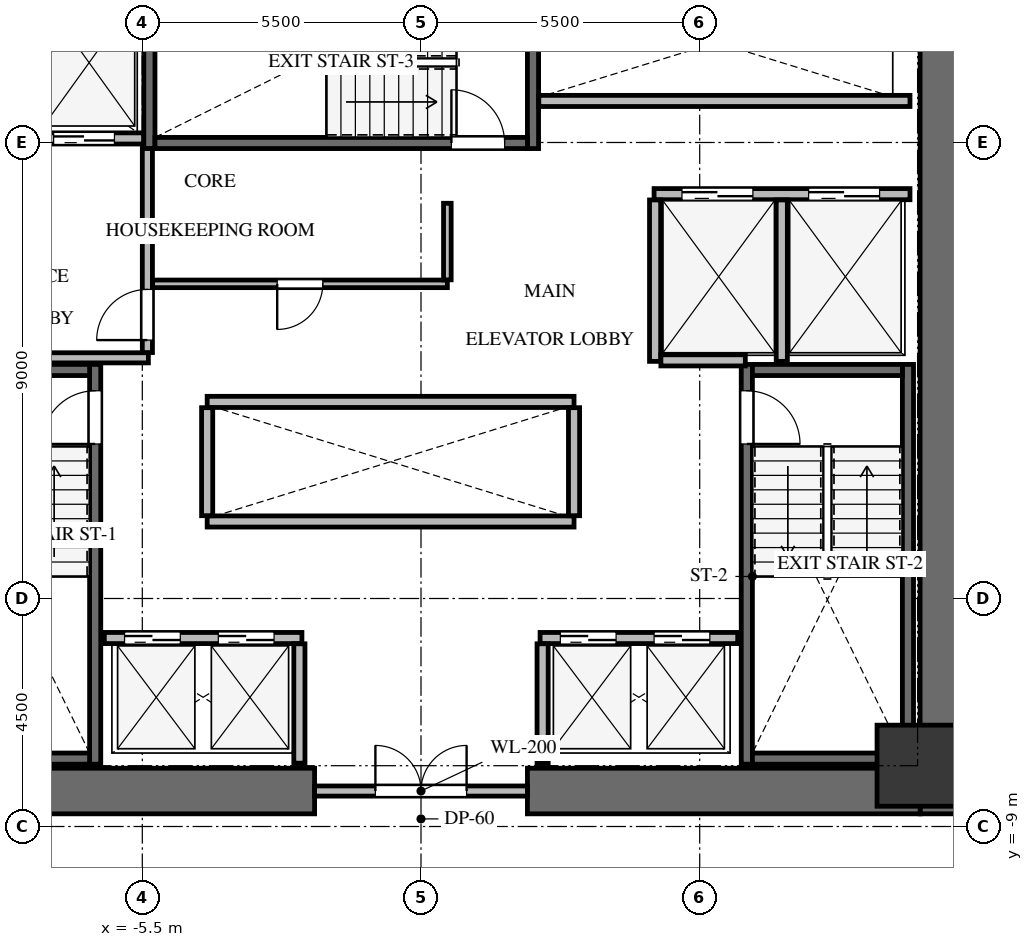
"""IFC4 building model, lengths in metres.
Left out: names, types, materials, properties, quantities, classifications, styles, units other than length and angle.
Written with IfcOpenShell. Run it as: python <this file> out.ifc"""

import sys

from ifc_helpers import new_model, si_unit, direction, frame, frame_2d, origin, origin_2d, place, context, subcontext, project, spatial, rectangle, extrude, source, transform, mapped, element, fill, save


model = new_model("IFC4")
c1 = context("Model", 3, precision=1e-05, world=origin(), true_north=direction((0.0, 1.0)))
c2 = subcontext(c1, "Body", "Model", "MODEL_VIEW")
j1 = project(units=[si_unit("LENGTHUNIT", "METRE"), si_unit("PLANEANGLEUNIT", "RADIAN")], contexts=[c1])
p1 = place(None, origin())
s1 = spatial("IfcSite", under=j1, at=p1, CompositionType="ELEMENT")
p2 = place(p1, origin())
s2 = spatial("IfcBuilding", under=s1, at=p2, CompositionType="ELEMENT")
p3 = place(p2, frame((0.0, 0.0, 45.6)))
s3 = spatial("IfcBuildingStorey", under=s2, at=p3, CompositionType="ELEMENT", Elevation=45.6)
p4 = place(p3, frame((10.3, -8.75, 0.0), z_axis=(0.0, 0.0, 1.0), x_axis=(0.0, 1.0, 0.0)))
e1 = element("IfcWall", 1, at=p4, inside=s3, PredefinedType="SHEAR", context=c2, shape_type="SweptSolid", body=[
    extrude(rectangle(XDim=17.5, YDim=0.9, at=frame_2d((8.75, 0.0))), origin(), (0.0, 0.0, 1.0), 3.3),
])
for number, where, z_axis, x_axis in (
    (2, (-9.85, -8.3, 0.0), (0.0, 0.0, 1.0), (1.0, 0.0, 0.0)),
    (3, (2.1, -8.3, 0.0), (0.0, 0.0, 1.0), (1.0, 0.0, 0.0)),
):
    element("IfcWall", number, at=place(p3, frame(where, z_axis=z_axis, x_axis=x_axis)), inside=s3, PredefinedType="SHEAR", context=c2, shape_type="SweptSolid", body=[
        extrude(rectangle(XDim=7.75, YDim=0.9, at=frame_2d((3.875, 0.0))), origin(), (0.0, 0.0, 1.0), 3.3),
    ])
p5 = place(p3, frame((-6.43, -7.77, -0.24), z_axis=(0.0, 0.0, 1.0), x_axis=(0.0, 1.0, 0.0)))
e4 = element("IfcWall", 4, at=p5, inside=s3, PredefinedType="SHEAR", context=c2, shape_type="SweptSolid", body=[
    extrude(rectangle(XDim=7.89, YDim=0.22, at=frame_2d((3.945, 0.0))), origin(), (0.0, 0.0, 1.0), 3.3),
])
p6 = place(p5, frame((6.32, 0.0, 0.0)))
e5 = element("IfcOpeningElement", 5, at=p6, cuts=e4, PredefinedType="OPENING", context=c2, shape_type="SweptSolid", body=[
    extrude(rectangle(XDim=1.05, YDim=2.15, at=frame_2d((0.525, 1.075))), frame((0.0, 0.12, 0.0), z_axis=(0.0, -1.0, 0.0), x_axis=(1.0, 0.0, 0.0)), (0.0, 0.0, 1.0), 0.24),
])
for number, where, z_axis, x_axis in (
    (6, (-9.5, -7.66, -0.24), (0.0, 0.0, 1.0), (1.0, 0.0, 0.0)),
    (7, (-6.54, 0.01, -0.24), (0.0, 0.0, 1.0), (-1.0, 0.0, 0.0)),
):
    element("IfcWall", number, at=place(p3, frame(where, z_axis=z_axis, x_axis=x_axis)), inside=s3, PredefinedType="SHEAR", context=c2, shape_type="SweptSolid", body=[
        extrude(rectangle(XDim=2.96, YDim=0.22, at=frame_2d((1.48, 0.0))), origin(), (0.0, 0.0, 1.0), 3.3),
    ])
p7 = place(p3, frame((9.61, -7.77, -0.24), z_axis=(0.0, 0.0, 1.0), x_axis=(0.0, 1.0, 0.0)))
e8 = element("IfcWall", 8, at=p7, inside=s3, PredefinedType="SHEAR", context=c2, shape_type="SweptSolid", body=[
    extrude(rectangle(XDim=7.89, YDim=0.22, at=frame_2d((3.945, 0.0))), origin(), (0.0, 0.0, 1.0), 3.3),
])
p8 = place(p3, frame((6.43, 0.12, -0.24), z_axis=(0.0, 0.0, 1.0), x_axis=(0.0, -1.0, 0.0)))
e9 = element("IfcWall", 9, at=p8, inside=s3, PredefinedType="SHEAR", context=c2, shape_type="SweptSolid", body=[
    extrude(rectangle(XDim=7.89, YDim=0.22, at=frame_2d((3.945, 0.0))), origin(), (0.0, 0.0, 1.0), 3.3),
])
p9 = place(p8, frame((0.52, 0.0, 0.0)))
e10 = element("IfcOpeningElement", 10, at=p9, cuts=e9, PredefinedType="OPENING", context=c2, shape_type="SweptSolid", body=[
    extrude(rectangle(XDim=1.05, YDim=2.15, at=frame_2d((0.525, 1.075))), frame((0.0, 0.12, 0.0), z_axis=(0.0, -1.0, 0.0), x_axis=(1.0, 0.0, 0.0)), (0.0, 0.0, 1.0), 0.24),
])
for number, where, z_axis, x_axis in (
    (11, (6.54, -7.66, -0.24), (0.0, 0.0, 1.0), (1.0, 0.0, 0.0)),
    (12, (9.5, 0.01, -0.24), (0.0, 0.0, 1.0), (-1.0, 0.0, 0.0)),
):
    element("IfcWall", number, at=place(p3, frame(where, z_axis=z_axis, x_axis=x_axis)), inside=s3, PredefinedType="SHEAR", context=c2, shape_type="SweptSolid", body=[
        extrude(rectangle(XDim=2.96, YDim=0.22, at=frame_2d((1.48, 0.0))), origin(), (0.0, 0.0, 1.0), 3.3),
    ])
for number, where, z_axis, x_axis in (
    (13, (2.21, 4.38, -0.24), (0.0, 0.0, 1.0), (0.0, 1.0, 0.0)),
    (14, (-5.36, 7.78, -0.24), (0.0, 0.0, 1.0), (0.0, -1.0, 0.0)),
):
    element("IfcWall", number, at=place(p3, frame(where, z_axis=z_axis, x_axis=x_axis)), inside=s3, PredefinedType="SHEAR", context=c2, shape_type="SweptSolid", body=[
        extrude(rectangle(XDim=3.4, YDim=0.22, at=frame_2d((1.7, 0.0))), origin(), (0.0, 0.0, 1.0), 3.3),
    ])
p10 = place(p3, frame((-5.25, 4.49, -0.24), z_axis=(0.0, 0.0, 1.0), x_axis=(1.0, 0.0, 0.0)))
e15 = element("IfcWall", 15, at=p10, inside=s3, PredefinedType="SHEAR", context=c2, shape_type="SweptSolid", body=[
    extrude(rectangle(XDim=7.35, YDim=0.22, at=frame_2d((3.675, 0.0))), origin(), (0.0, 0.0, 1.0), 3.3),
])
p11 = place(p10, frame((5.85, 0.0, 0.0)))
e16 = element("IfcOpeningElement", 16, at=p11, cuts=e15, PredefinedType="OPENING", context=c2, shape_type="SweptSolid", body=[
    extrude(rectangle(XDim=1.05, YDim=2.15, at=frame_2d((0.525, 1.075))), frame((0.0, 0.12, 0.0), z_axis=(0.0, -1.0, 0.0), x_axis=(1.0, 0.0, 0.0)), (0.0, 0.0, 1.0), 0.24),
])
m1 = source(origin(), c2, "Body", "SweptSolid", [
    extrude(rectangle(XDim=1.6, YDim=1.6, at=origin_2d()), origin(), (0.0, 0.0, 1.0), 3.3),
])
p12 = place(p3, frame((9.8, -7.8, -0.24), z_axis=(0.0, 0.0, 1.0), x_axis=(1.0, 0.0, 0.0)))
e17 = element("IfcColumn", 17, at=p12, inside=s3, PredefinedType="COLUMN", context=c2, shape_type="MappedRepresentation", body=[
    mapped(m1, transform((0.0, 0.0, 0.0), x_axis=(1.0, 0.0, 0.0), y_axis=(0.0, 1.0, 0.0), z_axis=(0.0, 0.0, 1.0), scale=1.0)),
])
p13 = place(p3, frame((-2.1, -8.3, 0.0), z_axis=(0.0, 0.0, 1.0), x_axis=(1.0, 0.0, 0.0)))
e18 = element("IfcWall", 18, at=p13, inside=s3, PredefinedType="SOLIDWALL", context=c2, shape_type="SweptSolid", body=[
    extrude(rectangle(XDim=4.2, YDim=0.2, at=frame_2d((2.1, 0.0))), origin(), (0.0, 0.0, 1.0), 3.045),
])
p14 = place(p13, frame((1.2, 0.0, 0.0)))
e19 = element("IfcOpeningElement", 19, at=p14, cuts=e18, PredefinedType="OPENING", context=c2, shape_type="SweptSolid", body=[
    extrude(rectangle(XDim=1.8, YDim=2.15, at=frame_2d((0.9, 1.075))), frame((0.0, 0.11, 0.0), z_axis=(0.0, -1.0, 0.0), x_axis=(1.0, 0.0, 0.0)), (0.0, 0.0, 1.0), 0.22),
])
p15 = place(p3, frame((-9.65, 4.58, 0.0), z_axis=(0.0, 0.0, 1.0), x_axis=(1.0, 0.0, 0.0)))
e20 = element("IfcWall", 20, at=p15, inside=s3, PredefinedType="SOLIDWALL", context=c2, shape_type="SweptSolid", body=[
    extrude(rectangle(XDim=4.175, YDim=0.22, at=frame_2d((2.087, 0.0))), origin(), (0.0, 0.0, 1.0), 3.045),
])
p16 = place(p15, frame((0.4, 0.0, 0.0)))
e21 = element("IfcOpeningElement", 21, at=p16, cuts=e20, PredefinedType="OPENING", context=c2, shape_type="SweptSolid", body=[
    extrude(rectangle(XDim=1.2, YDim=2.15, at=frame_2d((0.6, 1.075))), frame((0.0, 0.12, 0.0), z_axis=(0.0, -1.0, 0.0), x_axis=(1.0, 0.0, 0.0)), (0.0, 0.0, 1.0), 0.24),
])
p17 = place(p15, frame((2.4, 0.0, 0.0)))
e22 = element("IfcOpeningElement", 22, at=p17, cuts=e20, PredefinedType="OPENING", context=c2, shape_type="SweptSolid", body=[
    extrude(rectangle(XDim=1.2, YDim=2.15, at=frame_2d((0.6, 1.075))), frame((0.0, 0.12, 0.0), z_axis=(0.0, -1.0, 0.0), x_axis=(1.0, 0.0, 0.0)), (0.0, 0.0, 1.0), 0.24),
])
p18 = place(p3, frame((-9.65, 0.25, 0.0), z_axis=(0.0, 0.0, 1.0), x_axis=(1.0, 0.0, 0.0)))
e23 = element("IfcWall", 23, at=p18, inside=s3, PredefinedType="SOLIDWALL", context=c2, shape_type="SweptSolid", body=[
    extrude(rectangle(XDim=4.27, YDim=0.2, at=frame_2d((2.135, 0.0))), origin(), (0.0, 0.0, 1.0), 3.045),
])
p19 = place(p3, frame((-5.4, 0.354, 0.0), z_axis=(0.0, 0.0, 1.0), x_axis=(0.0, 1.0, 0.0)))
e24 = element("IfcWall", 24, at=p19, inside=s3, PredefinedType="SOLIDWALL", context=c2, shape_type="SweptSolid", body=[
    extrude(rectangle(XDim=4.026, YDim=0.2, at=frame_2d((2.013, 0.0))), origin(), (0.0, 0.0, 1.0), 3.045),
])
p20 = place(p19, frame((0.246, 0.0, 0.0)))
e25 = element("IfcOpeningElement", 25, at=p20, cuts=e24, PredefinedType="OPENING", context=c2, shape_type="SweptSolid", body=[
    extrude(rectangle(XDim=1.0, YDim=2.15, at=frame_2d((0.5, 1.075))), frame((0.0, 0.11, 0.0), z_axis=(0.0, -1.0, 0.0), x_axis=(1.0, 0.0, 0.0)), (0.0, 0.0, 1.0), 0.22),
])
p21 = place(p3, frame((4.6, 3.48, 0.0), z_axis=(0.0, 0.0, 1.0), x_axis=(1.0, 0.0, 0.0)))
e26 = element("IfcWall", 26, at=p21, inside=s3, PredefinedType="SOLIDWALL", context=c2, shape_type="SweptSolid", body=[
    extrude(rectangle(XDim=5.05, YDim=0.22, at=frame_2d((2.525, 0.0))), origin(), (0.0, 0.0, 1.0), 3.045),
])
p22 = place(p21, frame((0.55, 0.0, 0.0)))
e27 = element("IfcOpeningElement", 27, at=p22, cuts=e26, PredefinedType="OPENING", context=c2, shape_type="SweptSolid", body=[
    extrude(rectangle(XDim=1.4, YDim=2.15, at=frame_2d((0.7, 1.075))), frame((0.0, 0.12, 0.0), z_axis=(0.0, -1.0, 0.0), x_axis=(1.0, 0.0, 0.0)), (0.0, 0.0, 1.0), 0.24),
])
p23 = place(p21, frame((3.05, 0.0, 0.0)))
e28 = element("IfcOpeningElement", 28, at=p23, cuts=e26, PredefinedType="OPENING", context=c2, shape_type="SweptSolid", body=[
    extrude(rectangle(XDim=1.4, YDim=2.15, at=frame_2d((0.7, 1.075))), frame((0.0, 0.12, 0.0), z_axis=(0.0, -1.0, 0.0), x_axis=(1.0, 0.0, 0.0)), (0.0, 0.0, 1.0), 0.24),
])
for number, where, z_axis, x_axis in (
    (29, (4.62, 0.18, 0.0), (0.0, 0.0, 1.0), (0.0, 1.0, 0.0)),
    (30, (7.12, 0.18, 0.0), (0.0, 0.0, 1.0), (0.0, 1.0, 0.0)),
):
    element("IfcWall", number, at=place(p3, frame(where, z_axis=z_axis, x_axis=x_axis)), inside=s3, PredefinedType="SOLIDWALL", context=c2, shape_type="SweptSolid", body=[
        extrude(rectangle(XDim=3.186, YDim=0.22, at=frame_2d((1.593, 0.0))), origin(), (0.0, 0.0, 1.0), 3.045),
    ])
p24 = place(p3, frame((4.734, 0.2, 0.0), z_axis=(0.0, 0.0, 1.0), x_axis=(1.0, 0.0, 0.0)))
e31 = element("IfcWall", 31, at=p24, inside=s3, PredefinedType="SOLIDWALL", context=c2, shape_type="SweptSolid", body=[
    extrude(rectangle(XDim=1.666, YDim=0.22, at=frame_2d((0.833, 0.0))), origin(), (0.0, 0.0, 1.0), 3.045),
])
p25 = place(p3, frame((-6.25, -5.28, 0.0), z_axis=(0.0, 0.0, 1.0), x_axis=(1.0, 0.0, 0.0)))
e32 = element("IfcWall", 32, at=p25, inside=s3, PredefinedType="SOLIDWALL", context=c2, shape_type="SweptSolid", body=[
    extrude(rectangle(XDim=3.9, YDim=0.22, at=frame_2d((1.95, 0.0))), origin(), (0.0, 0.0, 1.0), 3.045),
])
p26 = place(p25, frame((0.4, 0.0, 0.0)))
e33 = element("IfcOpeningElement", 33, at=p26, cuts=e32, PredefinedType="OPENING", context=c2, shape_type="SweptSolid", body=[
    extrude(rectangle(XDim=1.1, YDim=2.15, at=frame_2d((0.55, 1.075))), frame((0.0, 0.12, 0.0), z_axis=(0.0, -1.0, 0.0), x_axis=(1.0, 0.0, 0.0)), (0.0, 0.0, 1.0), 0.24),
])
p27 = place(p25, frame((2.25, 0.0, 0.0)))
e34 = element("IfcOpeningElement", 34, at=p27, cuts=e32, PredefinedType="OPENING", context=c2, shape_type="SweptSolid", body=[
    extrude(rectangle(XDim=1.1, YDim=2.15, at=frame_2d((0.55, 1.075))), frame((0.0, 0.12, 0.0), z_axis=(0.0, -1.0, 0.0), x_axis=(1.0, 0.0, 0.0)), (0.0, 0.0, 1.0), 0.24),
])
p28 = place(p3, frame((2.35, -5.28, 0.0), z_axis=(0.0, 0.0, 1.0), x_axis=(1.0, 0.0, 0.0)))
e35 = element("IfcWall", 35, at=p28, inside=s3, PredefinedType="SOLIDWALL", context=c2, shape_type="SweptSolid", body=[
    extrude(rectangle(XDim=3.9, YDim=0.22, at=frame_2d((1.95, 0.0))), origin(), (0.0, 0.0, 1.0), 3.045),
])
p29 = place(p28, frame((0.4, 0.0, 0.0)))
e36 = element("IfcOpeningElement", 36, at=p29, cuts=e35, PredefinedType="OPENING", context=c2, shape_type="SweptSolid", body=[
    extrude(rectangle(XDim=1.1, YDim=2.15, at=frame_2d((0.55, 1.075))), frame((0.0, 0.12, 0.0), z_axis=(0.0, -1.0, 0.0), x_axis=(1.0, 0.0, 0.0)), (0.0, 0.0, 1.0), 0.24),
])
p30 = place(p28, frame((2.25, 0.0, 0.0)))
e37 = element("IfcOpeningElement", 37, at=p30, cuts=e35, PredefinedType="OPENING", context=c2, shape_type="SweptSolid", body=[
    extrude(rectangle(XDim=1.1, YDim=2.15, at=frame_2d((0.55, 1.075))), frame((0.0, 0.12, 0.0), z_axis=(0.0, -1.0, 0.0), x_axis=(1.0, 0.0, 0.0)), (0.0, 0.0, 1.0), 0.24),
])
for number, where, z_axis, x_axis in (
    (38, (-2.4, -7.75, 0.0), (0.0, 0.0, 1.0), (0.0, 1.0, 0.0)),
    (39, (2.4, -7.75, 0.0), (0.0, 0.0, 1.0), (0.0, 1.0, 0.0)),
):
    element("IfcWall", number, at=place(p3, frame(where, z_axis=z_axis, x_axis=x_axis)), inside=s3, PredefinedType="SOLIDWALL", context=c2, shape_type="SweptSolid", body=[
        extrude(rectangle(XDim=2.356, YDim=0.22, at=frame_2d((1.178, 0.0))), origin(), (0.0, 0.0, 1.0), 3.045),
    ])
for number, where, z_axis, x_axis in (
    (40, (-4.22, -2.98, 0.0), (0.0, 0.0, 1.0), (1.0, 0.0, 0.0)),
    (41, (-4.22, -0.62, 0.0), (0.0, 0.0, 1.0), (1.0, 0.0, 0.0)),
):
    element("IfcWall", number, at=place(p3, frame(where, z_axis=z_axis, x_axis=x_axis)), inside=s3, PredefinedType="SOLIDWALL", context=c2, shape_type="SweptSolid", body=[
        extrude(rectangle(XDim=7.24, YDim=0.22, at=frame_2d((3.62, 0.0))), origin(), (0.0, 0.0, 1.0), 3.045),
    ])
for number, where, z_axis, x_axis in (
    (42, (-4.22, -2.866, 0.0), (0.0, 0.0, 1.0), (0.0, 1.0, 0.0)),
    (43, (3.02, -2.866, 0.0), (0.0, 0.0, 1.0), (0.0, 1.0, 0.0)),
):
    element("IfcWall", number, at=place(p3, frame(where, z_axis=z_axis, x_axis=x_axis)), inside=s3, PredefinedType="SOLIDWALL", context=c2, shape_type="SweptSolid", body=[
        extrude(rectangle(XDim=2.132, YDim=0.22, at=frame_2d((1.066, 0.0))), origin(), (0.0, 0.0, 1.0), 3.045),
    ])
p31 = place(p3, frame((2.325, 5.32, 0.0), z_axis=(0.0, 0.0, 1.0), x_axis=(1.0, 0.0, 0.0)))
e44 = element("IfcWall", 44, at=p31, inside=s3, PredefinedType="SOLIDWALL", context=c2, shape_type="SweptSolid", body=[
    extrude(rectangle(XDim=7.325, YDim=0.22, at=frame_2d((3.663, 0.0))), origin(), (0.0, 0.0, 1.0), 3.045),
])
p32 = place(p3, frame((0.52, 1.71, 0.0), z_axis=(0.0, 0.0, 1.0), x_axis=(-1.0, 0.0, 0.0)))
e45 = element("IfcWall", 45, at=p32, inside=s3, PredefinedType="PARTITIONING", context=c2, shape_type="SweptSolid", body=[
    extrude(rectangle(XDim=5.816, YDim=0.15, at=frame_2d((2.908, 0.0))), origin(), (0.0, 0.0, 1.0), 3.045),
])
p33 = place(p32, frame((2.458, 0.0, 0.0)))
e46 = element("IfcOpeningElement", 46, at=p33, cuts=e45, PredefinedType="OPENING", context=c2, shape_type="SweptSolid", body=[
    extrude(rectangle(XDim=0.9, YDim=2.05, at=frame_2d((0.45, 1.025))), frame((0.0, 0.085, 0.0), z_axis=(0.0, -1.0, 0.0), x_axis=(1.0, 0.0, 0.0)), (0.0, 0.0, 1.0), 0.17),
])
p34 = place(p3, frame((0.52, 3.3, 0.0), z_axis=(0.0, 0.0, 1.0), x_axis=(0.0, -1.0, 0.0)))
e47 = element("IfcWall", 47, at=p34, inside=s3, PredefinedType="PARTITIONING", context=c2, shape_type="SweptSolid", body=[
    extrude(rectangle(XDim=1.511, YDim=0.15, at=frame_2d((0.755, 0.0))), origin(), (0.0, 0.0, 1.0), 3.045),
])
m2 = source(origin(), c2, "Body", "SweptSolid", [
    extrude(rectangle(XDim=1.05, YDim=2.15, at=frame_2d((0.525, 1.075))), frame((0.0, 0.025, 0.0), z_axis=(0.0, -1.0, 0.0), x_axis=(1.0, 0.0, 0.0)), (0.0, 0.0, 1.0), 0.05),
])
p35 = place(p6, origin())
e48 = element("IfcDoor", 48, at=p35, inside=s3, OperationType="SINGLE_SWING_LEFT", PredefinedType="DOOR", context=c2, shape_type="MappedRepresentation", body=[
    mapped(m2, transform((0.0, 0.0, 0.0), x_axis=(1.0, 0.0, 0.0), y_axis=(0.0, 1.0, 0.0), z_axis=(0.0, 0.0, 1.0), scale=1.0)),
])
fill(e5, e48)
m3 = source(origin(), c2, "Body", "SweptSolid", [
    extrude(rectangle(XDim=1.05, YDim=2.15, at=frame_2d((0.525, 1.075))), frame((0.0, 0.025, 0.0), z_axis=(0.0, -1.0, 0.0), x_axis=(1.0, 0.0, 0.0)), (0.0, 0.0, 1.0), 0.05),
])
p36 = place(p9, origin())
e49 = element("IfcDoor", 49, at=p36, inside=s3, OperationType="SINGLE_SWING_RIGHT", PredefinedType="DOOR", context=c2, shape_type="MappedRepresentation", body=[
    mapped(m3, transform((0.0, 0.0, 0.0), x_axis=(1.0, 0.0, 0.0), y_axis=(0.0, 1.0, 0.0), z_axis=(0.0, 0.0, 1.0), scale=1.0)),
])
fill(e10, e49)
p37 = place(p11, origin())
e50 = element("IfcDoor", 50, at=p37, inside=s3, OperationType="SINGLE_SWING_LEFT", PredefinedType="DOOR", context=c2, shape_type="MappedRepresentation", body=[
    mapped(m2, transform((0.0, 0.0, 0.0), x_axis=(1.0, 0.0, 0.0), y_axis=(0.0, 1.0, 0.0), z_axis=(0.0, 0.0, 1.0), scale=1.0)),
])
fill(e16, e50)
m4 = source(origin(), c2, "Body", "SweptSolid", [
    extrude(rectangle(XDim=1.8, YDim=2.15, at=frame_2d((0.9, 1.075))), frame((0.0, 0.025, 0.0), z_axis=(0.0, -1.0, 0.0), x_axis=(1.0, 0.0, 0.0)), (0.0, 0.0, 1.0), 0.05),
])
p38 = place(p14, origin())
e51 = element("IfcDoor", 51, at=p38, inside=s3, OperationType="DOUBLE_DOOR_SINGLE_SWING", PredefinedType="DOOR", context=c2, shape_type="MappedRepresentation", body=[
    mapped(m4, transform((0.0, 0.0, 0.0), x_axis=(1.0, 0.0, 0.0), y_axis=(0.0, 1.0, 0.0), z_axis=(0.0, 0.0, 1.0), scale=1.0)),
])
fill(e19, e51)
m5 = source(origin(), c2, "Body", "SweptSolid", [
    extrude(rectangle(XDim=1.2, YDim=2.15, at=frame_2d((0.6, 1.075))), frame((0.0, 0.025, 0.0), z_axis=(0.0, -1.0, 0.0), x_axis=(1.0, 0.0, 0.0)), (0.0, 0.0, 1.0), 0.05),
])
p39 = place(p17, origin())
e52 = element("IfcDoor", 52, at=p39, inside=s3, OperationType="DOUBLE_DOOR_SLIDING", PredefinedType="DOOR", context=c2, shape_type="MappedRepresentation", body=[
    mapped(m5, transform((0.0, 0.0, 0.0), x_axis=(1.0, 0.0, 0.0), y_axis=(0.0, 1.0, 0.0), z_axis=(0.0, 0.0, 1.0), scale=1.0)),
])
fill(e22, e52)
m6 = source(origin(), c2, "Body", "SweptSolid", [
    extrude(rectangle(XDim=1.0, YDim=2.15, at=frame_2d((0.5, 1.075))), frame((0.0, 0.025, 0.0), z_axis=(0.0, -1.0, 0.0), x_axis=(1.0, 0.0, 0.0)), (0.0, 0.0, 1.0), 0.05),
])
p40 = place(p20, origin())
e53 = element("IfcDoor", 53, at=p40, inside=s3, OperationType="SINGLE_SWING_LEFT", PredefinedType="DOOR", context=c2, shape_type="MappedRepresentation", body=[
    mapped(m6, transform((0.0, 0.0, 0.0), x_axis=(1.0, 0.0, 0.0), y_axis=(0.0, 1.0, 0.0), z_axis=(0.0, 0.0, 1.0), scale=1.0)),
])
fill(e25, e53)
m7 = source(origin(), c2, "Body", "SweptSolid", [
    extrude(rectangle(XDim=1.4, YDim=2.15, at=frame_2d((0.7, 1.075))), frame((0.0, 0.025, 0.0), z_axis=(0.0, -1.0, 0.0), x_axis=(1.0, 0.0, 0.0)), (0.0, 0.0, 1.0), 0.05),
])
p41 = place(p22, origin())
e54 = element("IfcDoor", 54, at=p41, inside=s3, OperationType="DOUBLE_DOOR_SLIDING", PredefinedType="DOOR", context=c2, shape_type="MappedRepresentation", body=[
    mapped(m7, transform((0.0, 0.0, 0.0), x_axis=(1.0, 0.0, 0.0), y_axis=(0.0, 1.0, 0.0), z_axis=(0.0, 0.0, 1.0), scale=1.0)),
])
fill(e27, e54)
p42 = place(p23, origin())
e55 = element("IfcDoor", 55, at=p42, inside=s3, OperationType="DOUBLE_DOOR_SLIDING", PredefinedType="DOOR", context=c2, shape_type="MappedRepresentation", body=[
    mapped(m7, transform((0.0, 0.0, 0.0), x_axis=(1.0, 0.0, 0.0), y_axis=(0.0, 1.0, 0.0), z_axis=(0.0, 0.0, 1.0), scale=1.0)),
])
fill(e28, e55)
m8 = source(origin(), c2, "Body", "SweptSolid", [
    extrude(rectangle(XDim=1.1, YDim=2.15, at=frame_2d((0.55, 1.075))), frame((0.0, 0.025, 0.0), z_axis=(0.0, -1.0, 0.0), x_axis=(1.0, 0.0, 0.0)), (0.0, 0.0, 1.0), 0.05),
])
p43 = place(p26, origin())
e56 = element("IfcDoor", 56, at=p43, inside=s3, OperationType="DOUBLE_DOOR_SLIDING", PredefinedType="DOOR", context=c2, shape_type="MappedRepresentation", body=[
    mapped(m8, transform((0.0, 0.0, 0.0), x_axis=(1.0, 0.0, 0.0), y_axis=(0.0, 1.0, 0.0), z_axis=(0.0, 0.0, 1.0), scale=1.0)),
])
fill(e33, e56)
p44 = place(p27, origin())
e57 = element("IfcDoor", 57, at=p44, inside=s3, OperationType="DOUBLE_DOOR_SLIDING", PredefinedType="DOOR", context=c2, shape_type="MappedRepresentation", body=[
    mapped(m8, transform((0.0, 0.0, 0.0), x_axis=(1.0, 0.0, 0.0), y_axis=(0.0, 1.0, 0.0), z_axis=(0.0, 0.0, 1.0), scale=1.0)),
])
fill(e34, e57)
p45 = place(p29, origin())
e58 = element("IfcDoor", 58, at=p45, inside=s3, OperationType="DOUBLE_DOOR_SLIDING", PredefinedType="DOOR", context=c2, shape_type="MappedRepresentation", body=[
    mapped(m8, transform((0.0, 0.0, 0.0), x_axis=(1.0, 0.0, 0.0), y_axis=(0.0, 1.0, 0.0), z_axis=(0.0, 0.0, 1.0), scale=1.0)),
])
fill(e36, e58)
p46 = place(p30, origin())
e59 = element("IfcDoor", 59, at=p46, inside=s3, OperationType="DOUBLE_DOOR_SLIDING", PredefinedType="DOOR", context=c2, shape_type="MappedRepresentation", body=[
    mapped(m8, transform((0.0, 0.0, 0.0), x_axis=(1.0, 0.0, 0.0), y_axis=(0.0, 1.0, 0.0), z_axis=(0.0, 0.0, 1.0), scale=1.0)),
])
fill(e37, e59)
m9 = source(origin(), c2, "Body", "SweptSolid", [
    extrude(rectangle(XDim=0.9, YDim=2.05, at=frame_2d((0.45, 1.025))), frame((0.0, 0.025, 0.0), z_axis=(0.0, -1.0, 0.0), x_axis=(1.0, 0.0, 0.0)), (0.0, 0.0, 1.0), 0.05),
])
p47 = place(p33, origin())
e60 = element("IfcDoor", 60, at=p47, inside=s3, OperationType="SINGLE_SWING_RIGHT", PredefinedType="DOOR", context=c2, shape_type="MappedRepresentation", body=[
    mapped(m9, transform((0.0, 0.0, 0.0), x_axis=(1.0, 0.0, 0.0), y_axis=(0.0, 1.0, 0.0), z_axis=(0.0, 0.0, 1.0), scale=1.0)),
])
fill(e46, e60)
save(model, sys.argv[1])
